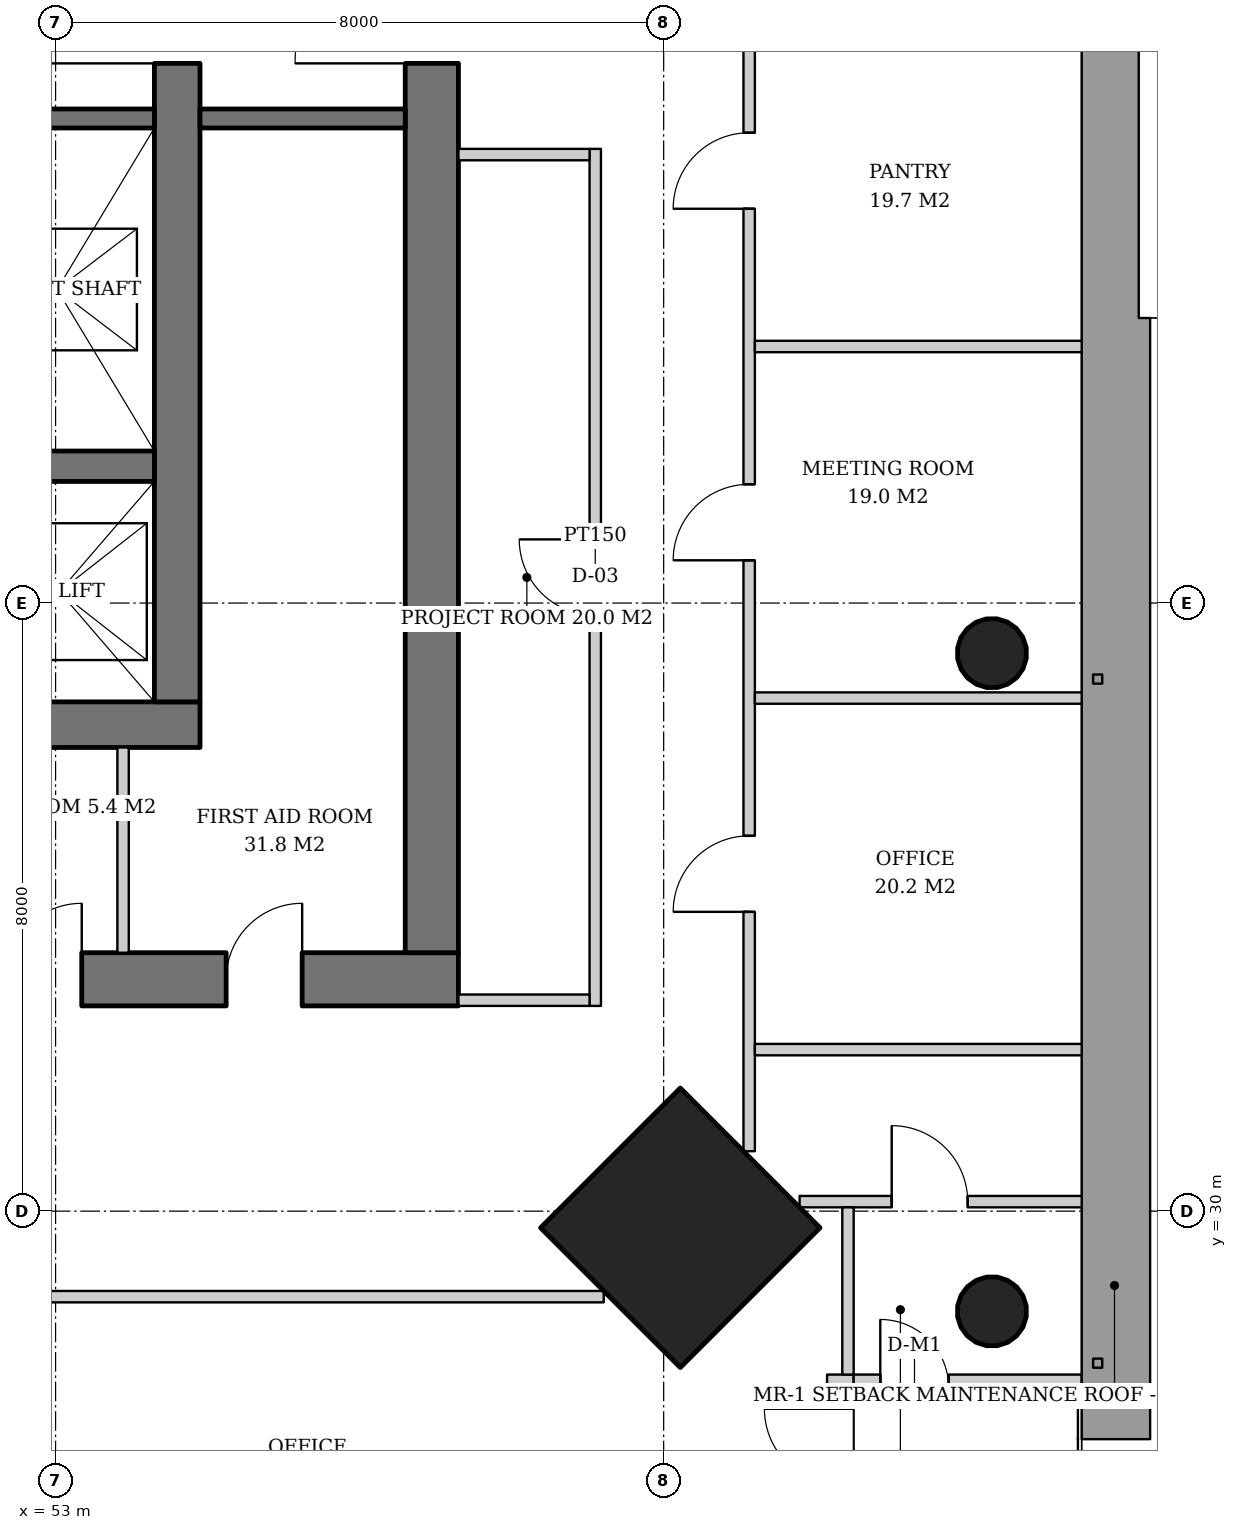
"""IFC4 building model, lengths in metres.
Left out: names, types, materials, properties, quantities, classifications, styles, units other than length and angle.
Written with IfcOpenShell. Run it as: python <this file> out.ifc"""

import sys

from ifc_helpers import new_model, si_unit, direction, frame, frame_2d, origin, origin_2d, place, context, subcontext, project, spatial, rectangle, hollow_circle, extrude, element, fill, save


model = new_model("IFC4")
c1 = context("Model", 3, precision=1e-05, world=origin(), true_north=direction((0.0, 1.0)))
c2 = subcontext(c1, "Body", "Model", "MODEL_VIEW")
j1 = project(units=[si_unit("LENGTHUNIT", "METRE"), si_unit("PLANEANGLEUNIT", "RADIAN")], contexts=[c1])
p1 = place(None, origin())
s1 = spatial("IfcSite", under=j1, at=p1, CompositionType="ELEMENT")
p2 = place(p1, origin())
s2 = spatial("IfcBuilding", under=s1, at=p2, CompositionType="ELEMENT")
p3 = place(p2, frame((0.0, 0.0, 135.0)))
s3 = spatial("IfcBuildingStorey", under=s2, at=p3, CompositionType="ELEMENT", Elevation=135.0)
p4 = place(p3, frame((65.357, 28.643, 0.0), z_axis=(-0.031962158256, 0.031962158256, 0.998977898093), x_axis=(-0.707106781187, -0.707106781187, 0.0)))
e1 = element("IfcColumn", 1, at=p4, inside=s3, PredefinedType="COLUMN", context=c2, shape_type="SweptSolid", body=[
    extrude(hollow_circle(Radius=0.457, WallThickness=0.03, at=origin_2d()), origin(), (0.0, 0.0, 1.0), 3.804),
])
p5 = place(p3, frame((65.357, 37.322, 0.0), z_axis=(-0.031974442509, 0.015923015547, 0.999361842679), x_axis=(-0.445775033553, -0.895145027055, 0.0)))
e2 = element("IfcColumn", 2, at=p5, inside=s3, PredefinedType="COLUMN", context=c2, shape_type="SweptSolid", body=[
    extrude(hollow_circle(Radius=0.457, WallThickness=0.03, at=origin_2d()), origin(), (0.0, 0.0, 1.0), 3.802),
])
p6 = place(p3, frame((61.257, 29.743, 0.0), z_axis=(-0.031898107953, 0.031898107953, 0.998981992539), x_axis=(-0.707106781187, -0.707106781187, 0.0)))
e3 = element("IfcColumn", 3, at=p6, inside=s3, PredefinedType="COLUMN", context=c2, shape_type="SweptSolid", body=[
    extrude(rectangle(XDim=2.6, YDim=2.6, at=origin_2d()), origin(), (0.0, 0.0, 1.0), 3.804),
])
p7 = place(p3, frame((35.1, 36.4, 0.0), z_axis=(0.0, 0.0, 1.0), x_axis=(1.0, 0.0, 0.0)))
e4 = element("IfcWall", 4, at=p7, inside=s3, PredefinedType="SHEAR", context=c2, shape_type="SweptSolid", body=[
    extrude(rectangle(XDim=19.8, YDim=0.6, at=frame_2d((9.9, 0.0))), origin(), (0.0, 0.0, 1.0), 3.8),
])
p8 = place(p7, frame((3.9, 0.0, 0.0)))
e5 = element("IfcOpeningElement", 5, at=p8, cuts=e4, PredefinedType="OPENING", context=c2, shape_type="SweptSolid", body=[
    extrude(rectangle(XDim=1.0, YDim=2.1, at=frame_2d((0.5, 1.05))), frame((0.0, 0.31, 0.0), z_axis=(0.0, -1.0, 0.0), x_axis=(1.0, 0.0, 0.0)), (0.0, 0.0, 1.0), 0.62),
])
p9 = place(p7, frame((15.35, 0.0, 0.0)))
e6 = element("IfcOpeningElement", 6, at=p9, cuts=e4, PredefinedType="OPENING", context=c2, shape_type="SweptSolid", body=[
    extrude(rectangle(XDim=1.0, YDim=2.1, at=frame_2d((0.5, 1.05))), frame((0.0, 0.31, 0.0), z_axis=(0.0, -1.0, 0.0), x_axis=(1.0, 0.0, 0.0)), (0.0, 0.0, 1.0), 0.62),
])
p10 = place(p3, frame((54.6, 36.7, 0.0), z_axis=(0.0, 0.0, 1.0), x_axis=(0.0, 1.0, 0.0)))
e7 = element("IfcWall", 7, at=p10, inside=s3, PredefinedType="SHEAR", context=c2, shape_type="SweptSolid", body=[
    extrude(rectangle(XDim=18.6, YDim=0.6, at=frame_2d((9.3, 0.0))), origin(), (0.0, 0.0, 1.0), 3.8),
])
p11 = place(p10, frame((8.4, 0.0, 0.0)))
e8 = element("IfcOpeningElement", 8, at=p11, cuts=e7, PredefinedType="OPENING", context=c2, shape_type="SweptSolid", body=[
    extrude(rectangle(XDim=1.8, YDim=2.4, at=frame_2d((0.9, 1.2))), frame((0.0, 0.31, 0.0), z_axis=(0.0, -1.0, 0.0), x_axis=(1.0, 0.0, 0.0)), (0.0, 0.0, 1.0), 0.62),
])
p12 = place(p3, frame((31.7, 33.05, 0.0), z_axis=(0.0, 0.0, 1.0), x_axis=(1.0, 0.0, 0.0)))
e9 = element("IfcWall", 9, at=p12, inside=s3, PredefinedType="SHEAR", context=c2, shape_type="SweptSolid", body=[
    extrude(rectangle(XDim=26.6, YDim=0.7, at=frame_2d((13.3, 0.0))), origin(), (0.0, 0.0, 1.0), 3.8),
])
p13 = place(p12, frame((7.3, 0.0, 0.0)))
e10 = element("IfcOpeningElement", 10, at=p13, cuts=e9, PredefinedType="OPENING", context=c2, shape_type="SweptSolid", body=[
    extrude(rectangle(XDim=1.0, YDim=2.1, at=frame_2d((0.5, 1.05))), frame((0.0, 0.36, 0.0), z_axis=(0.0, -1.0, 0.0), x_axis=(1.0, 0.0, 0.0)), (0.0, 0.0, 1.0), 0.72),
])
p14 = place(p12, frame((18.75, 0.0, 0.0)))
e11 = element("IfcOpeningElement", 11, at=p14, cuts=e9, PredefinedType="OPENING", context=c2, shape_type="SweptSolid", body=[
    extrude(rectangle(XDim=1.0, YDim=2.1, at=frame_2d((0.5, 1.05))), frame((0.0, 0.36, 0.0), z_axis=(0.0, -1.0, 0.0), x_axis=(1.0, 0.0, 0.0)), (0.0, 0.0, 1.0), 0.72),
])
p15 = place(p12, frame((1.85, 0.0, 0.0)))
e12 = element("IfcOpeningElement", 12, at=p15, cuts=e9, PredefinedType="OPENING", context=c2, shape_type="SweptSolid", body=[
    extrude(rectangle(XDim=1.0, YDim=2.1, at=frame_2d((0.5, 1.05))), frame((0.0, 0.36, 0.0), z_axis=(0.0, -1.0, 0.0), x_axis=(1.0, 0.0, 0.0)), (0.0, 0.0, 1.0), 0.72),
])
p16 = place(p12, frame((4.7, 0.0, 0.0)))
e13 = element("IfcOpeningElement", 13, at=p16, cuts=e9, PredefinedType="OPENING", context=c2, shape_type="SweptSolid", body=[
    extrude(rectangle(XDim=1.0, YDim=2.1, at=frame_2d((0.5, 1.05))), frame((0.0, 0.36, 0.0), z_axis=(0.0, -1.0, 0.0), x_axis=(1.0, 0.0, 0.0)), (0.0, 0.0, 1.0), 0.72),
])
p17 = place(p12, frame((12.44, 0.0, 0.0)))
e14 = element("IfcOpeningElement", 14, at=p17, cuts=e9, PredefinedType="OPENING", context=c2, shape_type="SweptSolid", body=[
    extrude(rectangle(XDim=1.0, YDim=2.1, at=frame_2d((0.5, 1.05))), frame((0.0, 0.36, 0.0), z_axis=(0.0, -1.0, 0.0), x_axis=(1.0, 0.0, 0.0)), (0.0, 0.0, 1.0), 0.72),
])
p18 = place(p12, frame((20.644, 0.0, 0.0)))
e15 = element("IfcOpeningElement", 15, at=p18, cuts=e9, PredefinedType="OPENING", context=c2, shape_type="SweptSolid", body=[
    extrude(rectangle(XDim=1.0, YDim=2.1, at=frame_2d((0.5, 1.05))), frame((0.0, 0.36, 0.0), z_axis=(0.0, -1.0, 0.0), x_axis=(1.0, 0.0, 0.0)), (0.0, 0.0, 1.0), 0.72),
])
p19 = place(p12, frame((23.544, 0.0, 0.0)))
e16 = element("IfcOpeningElement", 16, at=p19, cuts=e9, PredefinedType="OPENING", context=c2, shape_type="SweptSolid", body=[
    extrude(rectangle(XDim=1.0, YDim=2.1, at=frame_2d((0.5, 1.05))), frame((0.0, 0.36, 0.0), z_axis=(0.0, -1.0, 0.0), x_axis=(1.0, 0.0, 0.0)), (0.0, 0.0, 1.0), 0.72),
])
p20 = place(p3, frame((57.95, 33.4, 0.0), z_axis=(0.0, 0.0, 1.0), x_axis=(0.0, 1.0, 0.0)))
e17 = element("IfcWall", 17, at=p20, inside=s3, PredefinedType="SHEAR", context=c2, shape_type="SweptSolid", body=[
    extrude(rectangle(XDim=25.2, YDim=0.7, at=frame_2d((12.6, 0.0))), origin(), (0.0, 0.0, 1.0), 3.8),
])
p21 = place(p20, frame((11.7, 0.0, 0.0)))
e18 = element("IfcOpeningElement", 18, at=p21, cuts=e17, PredefinedType="OPENING", context=c2, shape_type="SweptSolid", body=[
    extrude(rectangle(XDim=1.8, YDim=2.4, at=frame_2d((0.9, 1.2))), frame((0.0, 0.36, 0.0), z_axis=(0.0, -1.0, 0.0), x_axis=(1.0, 0.0, 0.0)), (0.0, 0.0, 1.0), 0.72),
])
p22 = place(p3, frame((35.7, 39.8, 0.0), z_axis=(0.0, 0.0, 1.0), x_axis=(1.0, 0.0, 0.0)))
e19 = element("IfcWall", 19, at=p22, inside=s3, PredefinedType="SHEAR", context=c2, shape_type="SweptSolid", body=[
    extrude(rectangle(XDim=18.6, YDim=0.4, at=frame_2d((9.3, 0.0))), origin(), (0.0, 0.0, 1.0), 3.8),
])
p23 = place(p3, frame((63.325, 24.5, 0.0), z_axis=(0.0, 0.0, 1.0), x_axis=(0.0, 1.0, 0.0)))
e20 = element("IfcWall", 20, at=p23, inside=s3, PredefinedType="SOLIDWALL", context=c2, shape_type="SweptSolid", body=[
    extrude(rectangle(XDim=3.35, YDim=0.35, at=frame_2d((1.675, 0.0))), origin(), (0.0, 0.0, 1.0), 3.62),
])
p24 = place(p23, frame((1.9, 0.0, 0.0)))
e21 = element("IfcOpeningElement", 21, at=p24, cuts=e20, PredefinedType="OPENING", context=c2, shape_type="SweptSolid", body=[
    extrude(rectangle(XDim=1.0, YDim=2.4, at=frame_2d((0.5, 1.2))), frame((0.0, 0.185, 0.0), z_axis=(0.0, -1.0, 0.0), x_axis=(1.0, 0.0, 0.0)), (0.0, 0.0, 1.0), 0.37),
])
p25 = place(p3, frame((63.5, 27.675, 0.0), z_axis=(0.0, 0.0, 1.0), x_axis=(1.0, 0.0, 0.0)))
e22 = element("IfcWall", 22, at=p25, inside=s3, PredefinedType="SOLIDWALL", context=c2, shape_type="SweptSolid", body=[
    extrude(rectangle(XDim=3.0, YDim=0.35, at=frame_2d((1.5, 0.0))), origin(), (0.0, 0.0, 1.0), 3.62),
])
p26 = place(p25, frame((0.35, 0.0, 0.0)))
e23 = element("IfcOpeningElement", 23, at=p26, cuts=e22, PredefinedType="OPENING", context=c2, shape_type="SweptSolid", body=[
    extrude(rectangle(XDim=0.9, YDim=2.1, at=frame_2d((0.45, 1.05))), frame((0.0, 0.185, 0.0), z_axis=(0.0, -1.0, 0.0), x_axis=(1.0, 0.0, 0.0)), (0.0, 0.0, 1.0), 0.37),
])
p27 = place(p3, frame((48.93, 44.375, 0.0), z_axis=(0.0, 0.0, 1.0), x_axis=(1.0, 0.0, 0.0)))
e24 = element("IfcWall", 24, at=p27, inside=s3, PredefinedType="SHEAR", context=c2, shape_type="SweptSolid", body=[
    extrude(rectangle(XDim=5.37, YDim=0.25, at=frame_2d((2.685, 0.0))), origin(), (0.0, 0.0, 1.0), 3.8),
])
p28 = place(p3, frame((54.9, 44.375, 0.0), z_axis=(0.0, 0.0, 1.0), x_axis=(1.0, 0.0, 0.0)))
e25 = element("IfcWall", 25, at=p28, inside=s3, PredefinedType="SOLIDWALL", context=c2, shape_type="SweptSolid", body=[
    extrude(rectangle(XDim=2.7, YDim=0.25, at=frame_2d((1.35, 0.0))), origin(), (0.0, 0.0, 1.0), 3.62),
])
p29 = place(p3, frame((53.888, 33.4, 0.0), z_axis=(0.0, 0.0, 1.0), x_axis=(0.0, 1.0, 0.0)))
e26 = element("IfcWall", 26, at=p29, inside=s3, PredefinedType="SOLIDWALL", context=c2, shape_type="SweptSolid", body=[
    extrude(rectangle(XDim=2.7, YDim=0.15, at=frame_2d((1.35, 0.0))), origin(), (0.0, 0.0, 1.0), 3.62),
])
p30 = place(p3, frame((60.1, 32.7, 0.0), z_axis=(0.0, 0.0, 1.0), x_axis=(0.0, 1.0, 0.0)))
e27 = element("IfcWall", 27, at=p30, inside=s3, PredefinedType="PARTITIONING", context=c2, shape_type="SweptSolid", body=[
    extrude(rectangle(XDim=11.275, YDim=0.15, at=frame_2d((5.638, 0.0))), origin(), (0.0, 0.0, 1.0), 2.72),
])
p31 = place(p30, frame((5.137, 0.0, 0.0)))
e28 = element("IfcOpeningElement", 28, at=p31, cuts=e27, PredefinedType="OPENING", context=c2, shape_type="SweptSolid", body=[
    extrude(rectangle(XDim=1.0, YDim=2.1, at=frame_2d((0.5, 1.05))), frame((0.0, 0.085, 0.0), z_axis=(0.0, -1.0, 0.0), x_axis=(1.0, 0.0, 0.0)), (0.0, 0.0, 1.0), 0.17),
])
for number, where, z_axis, x_axis in (
    (29, (58.3, 32.775, 0.0), (0.0, 0.0, 1.0), (1.0, 0.0, 0.0)),
    (30, (58.3, 43.9, 0.0), (0.0, 0.0, 1.0), (1.0, 0.0, 0.0)),
):
    element("IfcWall", number, at=place(p3, frame(where, z_axis=z_axis, x_axis=x_axis)), inside=s3, PredefinedType="PARTITIONING", context=c2, shape_type="SweptSolid", body=[
        extrude(rectangle(XDim=1.725, YDim=0.15, at=frame_2d((0.862, 0.0))), origin(), (0.0, 0.0, 1.0), 3.62),
    ])
p32 = place(p3, frame((62.125, 30.789, 0.0), z_axis=(0.0, 0.0, 1.0), x_axis=(0.0, 1.0, 0.0)))
e31 = element("IfcWall", 31, at=p32, inside=s3, PredefinedType="PARTITIONING", context=c2, shape_type="SweptSolid", body=[
    extrude(rectangle(XDim=30.423, YDim=0.15, at=frame_2d((15.211, 0.0))), origin(), (0.0, 0.0, 1.0), 2.72),
])
p33 = place(p32, frame((3.149, 0.0, 0.0)))
e32 = element("IfcOpeningElement", 32, at=p33, cuts=e31, PredefinedType="OPENING", context=c2, shape_type="SweptSolid", body=[
    extrude(rectangle(XDim=1.0, YDim=2.1, at=frame_2d((0.5, 1.05))), frame((0.0, 0.085, 0.0), z_axis=(0.0, -1.0, 0.0), x_axis=(1.0, 0.0, 0.0)), (0.0, 0.0, 1.0), 0.17),
])
p34 = place(p32, frame((7.774, 0.0, 0.0)))
e33 = element("IfcOpeningElement", 33, at=p34, cuts=e31, PredefinedType="OPENING", context=c2, shape_type="SweptSolid", body=[
    extrude(rectangle(XDim=1.0, YDim=2.1, at=frame_2d((0.5, 1.05))), frame((0.0, 0.085, 0.0), z_axis=(0.0, -1.0, 0.0), x_axis=(1.0, 0.0, 0.0)), (0.0, 0.0, 1.0), 0.17),
])
p35 = place(p32, frame((12.399, 0.0, 0.0)))
e34 = element("IfcOpeningElement", 34, at=p35, cuts=e31, PredefinedType="OPENING", context=c2, shape_type="SweptSolid", body=[
    extrude(rectangle(XDim=1.0, YDim=2.1, at=frame_2d((0.5, 1.05))), frame((0.0, 0.085, 0.0), z_axis=(0.0, -1.0, 0.0), x_axis=(1.0, 0.0, 0.0)), (0.0, 0.0, 1.0), 0.17),
])
p36 = place(p32, frame((17.024, 0.0, 0.0)))
e35 = element("IfcOpeningElement", 35, at=p36, cuts=e31, PredefinedType="OPENING", context=c2, shape_type="SweptSolid", body=[
    extrude(rectangle(XDim=1.0, YDim=2.1, at=frame_2d((0.5, 1.05))), frame((0.0, 0.085, 0.0), z_axis=(0.0, -1.0, 0.0), x_axis=(1.0, 0.0, 0.0)), (0.0, 0.0, 1.0), 0.17),
])
p37 = place(p32, frame((21.649, 0.0, 0.0)))
e36 = element("IfcOpeningElement", 36, at=p37, cuts=e31, PredefinedType="OPENING", context=c2, shape_type="SweptSolid", body=[
    extrude(rectangle(XDim=1.0, YDim=2.1, at=frame_2d((0.5, 1.05))), frame((0.0, 0.085, 0.0), z_axis=(0.0, -1.0, 0.0), x_axis=(1.0, 0.0, 0.0)), (0.0, 0.0, 1.0), 0.17),
])
for number, where, z_axis, x_axis in (
    (37, (62.2, 32.125, 0.0), (0.0, 0.0, 1.0), (1.0, 0.0, 0.0)),
    (38, (62.2, 36.75, 0.0), (0.0, 0.0, 1.0), (1.0, 0.0, 0.0)),
    (39, (62.2, 41.375, 0.0), (0.0, 0.0, 1.0), (1.0, 0.0, 0.0)),
):
    element("IfcWall", number, at=place(p3, frame(where, z_axis=z_axis, x_axis=x_axis)), inside=s3, PredefinedType="PARTITIONING", context=c2, shape_type="SweptSolid", body=[
        extrude(rectangle(XDim=4.34, YDim=0.15, at=frame_2d((2.17, 0.0))), origin(), (0.0, 0.0, 1.0), 2.82),
    ])
p38 = place(p3, frame((29.789, 28.875, 0.0), z_axis=(0.0, 0.0, 1.0), x_axis=(1.0, 0.0, 0.0)))
e40 = element("IfcWall", 40, at=p38, inside=s3, PredefinedType="PARTITIONING", context=c2, shape_type="SweptSolid", body=[
    extrude(rectangle(XDim=30.423, YDim=0.15, at=frame_2d((15.211, 0.0))), origin(), (0.0, 0.0, 1.0), 2.72),
])
p39 = place(p38, frame((3.149, 0.0, 0.0)))
e41 = element("IfcOpeningElement", 41, at=p39, cuts=e40, PredefinedType="OPENING", context=c2, shape_type="SweptSolid", body=[
    extrude(rectangle(XDim=1.0, YDim=2.1, at=frame_2d((0.5, 1.05))), frame((0.0, 0.085, 0.0), z_axis=(0.0, -1.0, 0.0), x_axis=(1.0, 0.0, 0.0)), (0.0, 0.0, 1.0), 0.17),
])
p40 = place(p38, frame((7.774, 0.0, 0.0)))
e42 = element("IfcOpeningElement", 42, at=p40, cuts=e40, PredefinedType="OPENING", context=c2, shape_type="SweptSolid", body=[
    extrude(rectangle(XDim=1.0, YDim=2.1, at=frame_2d((0.5, 1.05))), frame((0.0, 0.085, 0.0), z_axis=(0.0, -1.0, 0.0), x_axis=(1.0, 0.0, 0.0)), (0.0, 0.0, 1.0), 0.17),
])
p41 = place(p38, frame((12.399, 0.0, 0.0)))
e43 = element("IfcOpeningElement", 43, at=p41, cuts=e40, PredefinedType="OPENING", context=c2, shape_type="SweptSolid", body=[
    extrude(rectangle(XDim=1.0, YDim=2.1, at=frame_2d((0.5, 1.05))), frame((0.0, 0.085, 0.0), z_axis=(0.0, -1.0, 0.0), x_axis=(1.0, 0.0, 0.0)), (0.0, 0.0, 1.0), 0.17),
])
p42 = place(p38, frame((21.649, 0.0, 0.0)))
e44 = element("IfcOpeningElement", 44, at=p42, cuts=e40, PredefinedType="OPENING", context=c2, shape_type="SweptSolid", body=[
    extrude(rectangle(XDim=1.0, YDim=2.1, at=frame_2d((0.5, 1.05))), frame((0.0, 0.085, 0.0), z_axis=(0.0, -1.0, 0.0), x_axis=(1.0, 0.0, 0.0)), (0.0, 0.0, 1.0), 0.17),
])
p43 = place(p3, frame((62.789, 30.125, 0.0), z_axis=(0.0, 0.0, 1.0), x_axis=(1.0, 0.0, 0.0)))
e45 = element("IfcWall", 45, at=p43, inside=s3, PredefinedType="PARTITIONING", context=c2, shape_type="SweptSolid", body=[
    extrude(rectangle(XDim=3.751, YDim=0.15, at=frame_2d((1.876, 0.0))), origin(), (0.0, 0.0, 1.0), 2.82),
])
p44 = place(p43, frame((1.211, 0.0, 0.0)))
e46 = element("IfcOpeningElement", 46, at=p44, cuts=e45, PredefinedType="OPENING", context=c2, shape_type="SweptSolid", body=[
    extrude(rectangle(XDim=1.0, YDim=2.1, at=frame_2d((0.5, 1.05))), frame((0.0, 0.085, 0.0), z_axis=(0.0, -1.0, 0.0), x_axis=(1.0, 0.0, 0.0)), (0.0, 0.0, 1.0), 0.17),
])
p45 = place(p3, frame((63.425, 30.05, 0.0), z_axis=(0.0, 0.0, 1.0), x_axis=(0.0, -1.0, 0.0)))
e47 = element("IfcWall", 47, at=p45, inside=s3, PredefinedType="PARTITIONING", context=c2, shape_type="SweptSolid", body=[
    extrude(rectangle(XDim=2.2, YDim=0.15, at=frame_2d((1.1, 0.0))), origin(), (0.0, 0.0, 1.0), 3.07),
])
p46 = place(p26, origin())
e48 = element("IfcDoor", 48, at=p46, inside=s3, OperationType="SINGLE_SWING_LEFT", PredefinedType="DOOR", context=c2, shape_type="SweptSolid", body=[
    extrude(rectangle(XDim=0.9, YDim=2.1, at=frame_2d((0.45, 1.05))), frame((0.0, 0.025, 0.0), z_axis=(0.0, -1.0, 0.0), x_axis=(1.0, 0.0, 0.0)), (0.0, 0.0, 1.0), 0.05),
])
fill(e23, e48)
p47 = place(p24, origin())
e49 = element("IfcDoor", 49, at=p47, inside=s3, OperationType="SINGLE_SWING_RIGHT", PredefinedType="DOOR", context=c2, shape_type="SweptSolid", body=[
    extrude(rectangle(XDim=1.0, YDim=2.4, at=frame_2d((0.5, 1.2))), frame((0.0, 0.025, 0.0), z_axis=(0.0, -1.0, 0.0), x_axis=(1.0, 0.0, 0.0)), (0.0, 0.0, 1.0), 0.05),
])
fill(e21, e49)
p48 = place(p11, origin())
e50 = element("IfcDoor", 50, at=p48, inside=s3, OperationType="DOUBLE_DOOR_SINGLE_SWING", PredefinedType="DOOR", context=c2, shape_type="SweptSolid", body=[
    extrude(rectangle(XDim=1.8, YDim=2.4, at=frame_2d((0.9, 1.2))), frame((0.0, 0.025, 0.0), z_axis=(0.0, -1.0, 0.0), x_axis=(1.0, 0.0, 0.0)), (0.0, 0.0, 1.0), 0.05),
])
fill(e8, e50)
p49 = place(p21, origin())
e51 = element("IfcDoor", 51, at=p49, inside=s3, OperationType="DOUBLE_DOOR_SINGLE_SWING", PredefinedType="DOOR", context=c2, shape_type="SweptSolid", body=[
    extrude(rectangle(XDim=1.8, YDim=2.4, at=frame_2d((0.9, 1.2))), frame((0.0, 0.025, 0.0), z_axis=(0.0, -1.0, 0.0), x_axis=(1.0, 0.0, 0.0)), (0.0, 0.0, 1.0), 0.05),
])
fill(e18, e51)
p50 = place(p18, origin())
e52 = element("IfcDoor", 52, at=p50, inside=s3, OperationType="SINGLE_SWING_RIGHT", PredefinedType="DOOR", context=c2, shape_type="SweptSolid", body=[
    extrude(rectangle(XDim=1.0, YDim=2.1, at=frame_2d((0.5, 1.05))), frame((0.0, 0.34, 0.0), z_axis=(0.0, -1.0, 0.0), x_axis=(1.0, 0.0, 0.0)), (0.0, 0.0, 1.0), 0.05),
])
fill(e15, e52)
p51 = place(p19, origin())
e53 = element("IfcDoor", 53, at=p51, inside=s3, OperationType="SINGLE_SWING_RIGHT", PredefinedType="DOOR", context=c2, shape_type="SweptSolid", body=[
    extrude(rectangle(XDim=1.0, YDim=2.1, at=frame_2d((0.5, 1.05))), frame((0.0, 0.34, 0.0), z_axis=(0.0, -1.0, 0.0), x_axis=(1.0, 0.0, 0.0)), (0.0, 0.0, 1.0), 0.05),
])
fill(e16, e53)
p52 = place(p31, origin())
e54 = element("IfcDoor", 54, at=p52, inside=s3, OperationType="SINGLE_SWING_RIGHT", PredefinedType="DOOR", context=c2, shape_type="SweptSolid", body=[
    extrude(rectangle(XDim=1.0, YDim=2.1, at=frame_2d((0.5, 1.05))), frame((0.0, 0.025, 0.0), z_axis=(0.0, -1.0, 0.0), x_axis=(1.0, 0.0, 0.0)), (0.0, 0.0, 1.0), 0.05),
])
fill(e28, e54)
p53 = place(p33, origin())
e55 = element("IfcDoor", 55, at=p53, inside=s3, OperationType="SINGLE_SWING_LEFT", PredefinedType="DOOR", context=c2, shape_type="SweptSolid", body=[
    extrude(rectangle(XDim=1.0, YDim=2.1, at=frame_2d((0.5, 1.05))), frame((0.0, 0.025, 0.0), z_axis=(0.0, -1.0, 0.0), x_axis=(1.0, 0.0, 0.0)), (0.0, 0.0, 1.0), 0.05),
])
fill(e32, e55)
p54 = place(p34, origin())
e56 = element("IfcDoor", 56, at=p54, inside=s3, OperationType="SINGLE_SWING_LEFT", PredefinedType="DOOR", context=c2, shape_type="SweptSolid", body=[
    extrude(rectangle(XDim=1.0, YDim=2.1, at=frame_2d((0.5, 1.05))), frame((0.0, 0.025, 0.0), z_axis=(0.0, -1.0, 0.0), x_axis=(1.0, 0.0, 0.0)), (0.0, 0.0, 1.0), 0.05),
])
fill(e33, e56)
p55 = place(p35, origin())
e57 = element("IfcDoor", 57, at=p55, inside=s3, OperationType="SINGLE_SWING_LEFT", PredefinedType="DOOR", context=c2, shape_type="SweptSolid", body=[
    extrude(rectangle(XDim=1.0, YDim=2.1, at=frame_2d((0.5, 1.05))), frame((0.0, 0.025, 0.0), z_axis=(0.0, -1.0, 0.0), x_axis=(1.0, 0.0, 0.0)), (0.0, 0.0, 1.0), 0.05),
])
fill(e34, e57)
p56 = place(p44, origin())
e58 = element("IfcDoor", 58, at=p56, inside=s3, OperationType="SINGLE_SWING_LEFT", PredefinedType="DOOR", context=c2, shape_type="SweptSolid", body=[
    extrude(rectangle(XDim=1.0, YDim=2.1, at=frame_2d((0.5, 1.05))), frame((0.0, 0.025, 0.0), z_axis=(0.0, -1.0, 0.0), x_axis=(1.0, 0.0, 0.0)), (0.0, 0.0, 1.0), 0.05),
])
fill(e46, e58)
save(model, sys.argv[1])
